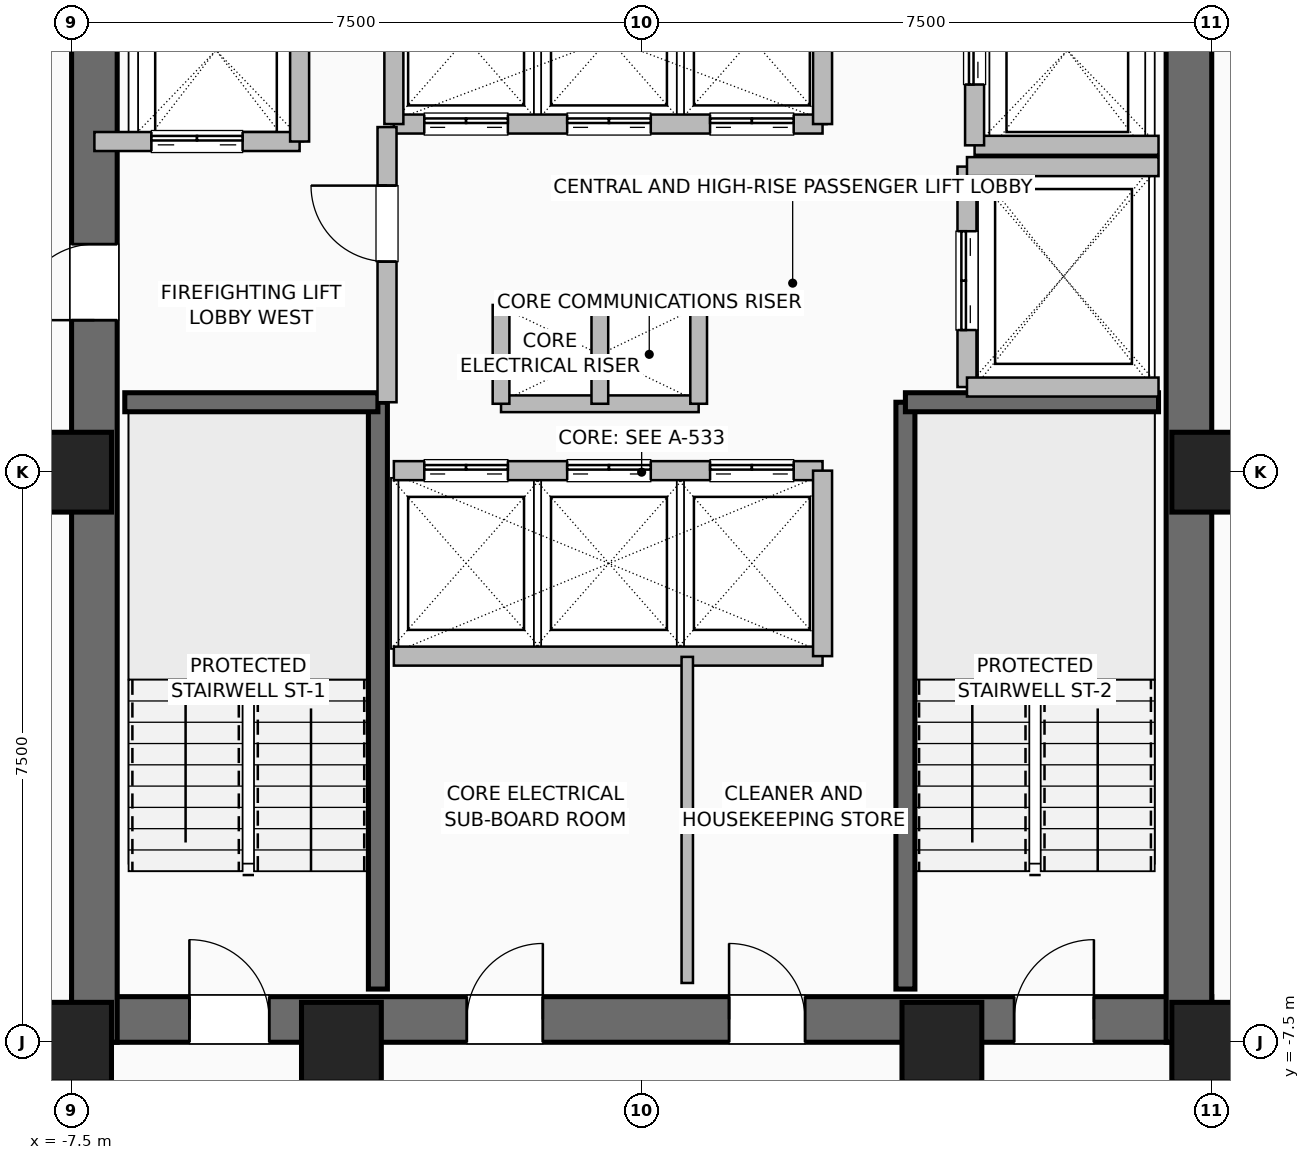
"""IFC4 building model, lengths in metres.
Left out: names, types, materials, properties, quantities, classifications, styles, units other than length and angle.
Written with IfcOpenShell. Run it as: python <this file> out.ifc"""

import sys

from ifc_helpers import new_model, si_unit, direction, frame, frame_2d, origin, origin_2d, place, context, subcontext, project, spatial, rectangle, hollow_rectangle, extrude, element, fill, save


model = new_model("IFC4")
c1 = context("Model", 3, precision=1e-05, world=origin(), true_north=direction((0.0, 1.0)))
c2 = subcontext(c1, "Body", "Model", "MODEL_VIEW")
j1 = project(units=[si_unit("LENGTHUNIT", "METRE"), si_unit("PLANEANGLEUNIT", "RADIAN")], contexts=[c1])
p1 = place(None, origin())
s1 = spatial("IfcSite", under=j1, at=p1, CompositionType="ELEMENT")
p2 = place(p1, origin())
s2 = spatial("IfcBuilding", under=s1, at=p2, CompositionType="ELEMENT")
p3 = place(p2, frame((0.0, 0.0, 126.4)))
s3 = spatial("IfcBuildingStorey", under=s2, at=p3, CompositionType="ELEMENT", Elevation=126.4)
for number, where, z_axis, x_axis in (
    (1, (-7.5, -7.5, 0.0), (0.0, 0.0, 1.0), (1.0, 0.0, 0.0)),
    (2, (-3.95, -7.5, 0.0), (0.0, 0.0, 1.0), (1.0, 0.0, 0.0)),
    (3, (3.95, -7.5, 0.0), (0.0, 0.0, 1.0), (1.0, 0.0, 0.0)),
    (4, (7.5, -7.5, 0.0), (0.0, 0.0, 1.0), (1.0, 0.0, 0.0)),
    (5, (7.5, 0.0, 0.0), (0.0, 0.0, 1.0), (1.0, 0.0, 0.0)),
    (6, (-7.5, 0.0, 0.0), (0.0, 0.0, 1.0), (1.0, 0.0, 0.0)),
):
    element("IfcColumn", number, at=place(p3, frame(where, z_axis=z_axis, x_axis=x_axis)), inside=s3, PredefinedType="COLUMN", context=c2, shape_type="SweptSolid", body=[
        extrude(hollow_rectangle(XDim=1.05, YDim=1.05, WallThickness=0.05, at=origin_2d()), origin(), (0.0, 0.0, 1.0), 3.6),
    ])
p4 = place(p3, frame((-7.5, -7.2, 0.0), z_axis=(0.0, 0.0, 1.0), x_axis=(1.0, 0.0, 0.0)))
e7 = element("IfcWall", 7, at=p4, inside=s3, PredefinedType="SHEAR", context=c2, shape_type="SweptSolid", body=[
    extrude(rectangle(XDim=15.0, YDim=0.6, at=frame_2d((7.5, 0.0))), origin(), (0.0, 0.0, 1.0), 3.36),
])
p5 = place(p4, frame((1.55, 0.0, 0.0)))
e8 = element("IfcOpeningElement", 8, at=p5, cuts=e7, PredefinedType="OPENING", context=c2, shape_type="SweptSolid", body=[
    extrude(rectangle(XDim=1.05, YDim=2.08, at=frame_2d((0.525, 1.04))), frame((0.0, 0.31, 0.0), z_axis=(0.0, -1.0, 0.0), x_axis=(1.0, 0.0, 0.0)), (0.0, 0.0, 1.0), 0.62),
])
p6 = place(p4, frame((12.4, 0.0, 0.0)))
e9 = element("IfcOpeningElement", 9, at=p6, cuts=e7, PredefinedType="OPENING", context=c2, shape_type="SweptSolid", body=[
    extrude(rectangle(XDim=1.05, YDim=2.08, at=frame_2d((0.525, 1.04))), frame((0.0, 0.31, 0.0), z_axis=(0.0, -1.0, 0.0), x_axis=(1.0, 0.0, 0.0)), (0.0, 0.0, 1.0), 0.62),
])
p7 = place(p4, frame((5.2, 0.0, 0.0)))
e10 = element("IfcOpeningElement", 10, at=p7, cuts=e7, PredefinedType="OPENING", context=c2, shape_type="SweptSolid", body=[
    extrude(rectangle(XDim=1.0, YDim=2.08, at=frame_2d((0.5, 1.04))), frame((0.0, 0.31, 0.0), z_axis=(0.0, -1.0, 0.0), x_axis=(1.0, 0.0, 0.0)), (0.0, 0.0, 1.0), 0.62),
])
p8 = place(p4, frame((8.65, 0.0, 0.0)))
e11 = element("IfcOpeningElement", 11, at=p8, cuts=e7, PredefinedType="OPENING", context=c2, shape_type="SweptSolid", body=[
    extrude(rectangle(XDim=1.0, YDim=2.08, at=frame_2d((0.5, 1.04))), frame((0.0, 0.31, 0.0), z_axis=(0.0, -1.0, 0.0), x_axis=(1.0, 0.0, 0.0)), (0.0, 0.0, 1.0), 0.62),
])
p9 = place(p3, frame((-7.2, -7.5, 0.0), z_axis=(0.0, 0.0, 1.0), x_axis=(0.0, 1.0, 0.0)))
e12 = element("IfcWall", 12, at=p9, inside=s3, PredefinedType="SHEAR", context=c2, shape_type="SweptSolid", body=[
    extrude(rectangle(XDim=15.0, YDim=0.6, at=frame_2d((7.5, 0.0))), origin(), (0.0, 0.0, 1.0), 3.36),
])
p10 = place(p9, frame((9.5, 0.0, 0.0)))
e13 = element("IfcOpeningElement", 13, at=p10, cuts=e12, PredefinedType="OPENING", context=c2, shape_type="SweptSolid", body=[
    extrude(rectangle(XDim=1.0, YDim=2.08, at=frame_2d((0.5, 1.04))), frame((0.0, 0.31, 0.0), z_axis=(0.0, -1.0, 0.0), x_axis=(1.0, 0.0, 0.0)), (0.0, 0.0, 1.0), 0.62),
])
p11 = place(p3, frame((7.2, -7.5, 0.0), z_axis=(0.0, 0.0, 1.0), x_axis=(0.0, 1.0, 0.0)))
e14 = element("IfcWall", 14, at=p11, inside=s3, PredefinedType="SHEAR", context=c2, shape_type="SweptSolid", body=[
    extrude(rectangle(XDim=15.0, YDim=0.6, at=frame_2d((7.5, 0.0))), origin(), (0.0, 0.0, 1.0), 3.36),
])
p12 = place(p3, frame((-3.47, -6.8, 0.0), z_axis=(0.0, 0.0, 1.0), x_axis=(0.0, 1.0, 0.0)))
e15 = element("IfcWall", 15, at=p12, inside=s3, PredefinedType="SHEAR", context=c2, shape_type="SweptSolid", body=[
    extrude(rectangle(XDim=7.72, YDim=0.25, at=frame_2d((3.86, 0.0))), origin(), (0.0, 0.0, 1.0), 3.36),
])
p13 = place(p3, frame((-6.8, 0.92, 0.0), z_axis=(0.0, 0.0, 1.0), x_axis=(1.0, 0.0, 0.0)))
e16 = element("IfcWall", 16, at=p13, inside=s3, PredefinedType="SHEAR", context=c2, shape_type="SweptSolid", body=[
    extrude(rectangle(XDim=3.33, YDim=0.25, at=frame_2d((1.665, 0.0))), origin(), (0.0, 0.0, 1.0), 3.36),
])
p14 = place(p3, frame((3.47, -6.8, 0.0), z_axis=(0.0, 0.0, 1.0), x_axis=(0.0, 1.0, 0.0)))
e17 = element("IfcWall", 17, at=p14, inside=s3, PredefinedType="SHEAR", context=c2, shape_type="SweptSolid", body=[
    extrude(rectangle(XDim=7.72, YDim=0.25, at=frame_2d((3.86, 0.0))), origin(), (0.0, 0.0, 1.0), 3.36),
])
p15 = place(p3, frame((3.47, 0.92, 0.0), z_axis=(0.0, 0.0, 1.0), x_axis=(1.0, 0.0, 0.0)))
e18 = element("IfcWall", 18, at=p15, inside=s3, PredefinedType="SHEAR", context=c2, shape_type="SweptSolid", body=[
    extrude(rectangle(XDim=3.33, YDim=0.25, at=frame_2d((1.665, 0.0))), origin(), (0.0, 0.0, 1.0), 3.36),
])
for number, where, z_axis, x_axis in (
    (19, (-1.85, 2.2, 0.0), (0.0, 0.0, 1.0), (1.0, 0.0, 0.0)),
    (20, (-1.85, 0.9, 0.0), (0.0, 0.0, 1.0), (1.0, 0.0, 0.0)),
):
    element("IfcWall", number, at=place(p3, frame(where, z_axis=z_axis, x_axis=x_axis)), inside=s3, PredefinedType="PARTITIONING", context=c2, shape_type="SweptSolid", body=[
        extrude(rectangle(XDim=2.6, YDim=0.22, at=frame_2d((1.3, 0.0))), origin(), (0.0, 0.0, 1.0), 3.36),
    ])
for number, where, z_axis, x_axis in (
    (21, (-0.55, 0.9, 0.0), (0.0, 0.0, 1.0), (0.0, 1.0, 0.0)),
    (22, (0.75, 0.9, 0.0), (0.0, 0.0, 1.0), (0.0, 1.0, 0.0)),
    (23, (-1.85, 0.9, 0.0), (0.0, 0.0, 1.0), (0.0, 1.0, 0.0)),
):
    element("IfcWall", number, at=place(p3, frame(where, z_axis=z_axis, x_axis=x_axis)), inside=s3, PredefinedType="PARTITIONING", context=c2, shape_type="SweptSolid", body=[
        extrude(rectangle(XDim=1.3, YDim=0.22, at=frame_2d((0.65, 0.0))), origin(), (0.0, 0.0, 1.0), 3.36),
    ])
p16 = place(p3, frame((-3.26, 0.02, 0.0), z_axis=(0.0, 0.0, 1.0), x_axis=(1.0, 0.0, 0.0)))
e24 = element("IfcWall", 24, at=p16, inside=s3, PredefinedType="SHEAR", context=c2, shape_type="SweptSolid", body=[
    extrude(rectangle(XDim=5.64, YDim=0.25, at=frame_2d((2.82, 0.0))), origin(), (0.0, 0.0, 1.0), 3.36),
])
p17 = place(p16, frame((0.4, 0.0, 0.0)))
e25 = element("IfcOpeningElement", 25, at=p17, cuts=e24, PredefinedType="OPENING", context=c2, shape_type="SweptSolid", body=[
    extrude(rectangle(XDim=1.1, YDim=2.2, at=frame_2d((0.55, 1.1))), frame((0.0, 0.135, 0.0), z_axis=(0.0, -1.0, 0.0), x_axis=(1.0, 0.0, 0.0)), (0.0, 0.0, 1.0), 0.27),
])
p18 = place(p16, frame((2.28, 0.0, 0.0)))
e26 = element("IfcOpeningElement", 26, at=p18, cuts=e24, PredefinedType="OPENING", context=c2, shape_type="SweptSolid", body=[
    extrude(rectangle(XDim=1.1, YDim=2.2, at=frame_2d((0.55, 1.1))), frame((0.0, 0.135, 0.0), z_axis=(0.0, -1.0, 0.0), x_axis=(1.0, 0.0, 0.0)), (0.0, 0.0, 1.0), 0.27),
])
p19 = place(p16, frame((4.16, 0.0, 0.0)))
e27 = element("IfcOpeningElement", 27, at=p19, cuts=e24, PredefinedType="OPENING", context=c2, shape_type="SweptSolid", body=[
    extrude(rectangle(XDim=1.1, YDim=2.2, at=frame_2d((0.55, 1.1))), frame((0.0, 0.135, 0.0), z_axis=(0.0, -1.0, 0.0), x_axis=(1.0, 0.0, 0.0)), (0.0, 0.0, 1.0), 0.27),
])
p20 = place(p3, frame((-3.26, -2.42, 0.0), z_axis=(0.0, 0.0, 1.0), x_axis=(1.0, 0.0, 0.0)))
e28 = element("IfcWall", 28, at=p20, inside=s3, PredefinedType="SHEAR", context=c2, shape_type="SweptSolid", body=[
    extrude(rectangle(XDim=5.64, YDim=0.25, at=frame_2d((2.82, 0.0))), origin(), (0.0, 0.0, 1.0), 3.36),
])
p21 = place(p3, frame((2.38, -2.42, 0.0), z_axis=(0.0, 0.0, 1.0), x_axis=(0.0, 1.0, 0.0)))
e29 = element("IfcWall", 29, at=p21, inside=s3, PredefinedType="SHEAR", context=c2, shape_type="SweptSolid", body=[
    extrude(rectangle(XDim=2.44, YDim=0.25, at=frame_2d((1.22, 0.0))), origin(), (0.0, 0.0, 1.0), 3.36),
])
p22 = place(p3, frame((-3.26, 4.58, 0.0), z_axis=(0.0, 0.0, 1.0), x_axis=(1.0, 0.0, 0.0)))
e30 = element("IfcWall", 30, at=p22, inside=s3, PredefinedType="SHEAR", context=c2, shape_type="SweptSolid", body=[
    extrude(rectangle(XDim=5.64, YDim=0.25, at=frame_2d((2.82, 0.0))), origin(), (0.0, 0.0, 1.0), 3.36),
])
p23 = place(p22, frame((0.4, 0.0, 0.0)))
e31 = element("IfcOpeningElement", 31, at=p23, cuts=e30, PredefinedType="OPENING", context=c2, shape_type="SweptSolid", body=[
    extrude(rectangle(XDim=1.1, YDim=2.2, at=frame_2d((0.55, 1.1))), frame((0.0, 0.135, 0.0), z_axis=(0.0, -1.0, 0.0), x_axis=(1.0, 0.0, 0.0)), (0.0, 0.0, 1.0), 0.27),
])
p24 = place(p22, frame((2.28, 0.0, 0.0)))
e32 = element("IfcOpeningElement", 32, at=p24, cuts=e30, PredefinedType="OPENING", context=c2, shape_type="SweptSolid", body=[
    extrude(rectangle(XDim=1.1, YDim=2.2, at=frame_2d((0.55, 1.1))), frame((0.0, 0.135, 0.0), z_axis=(0.0, -1.0, 0.0), x_axis=(1.0, 0.0, 0.0)), (0.0, 0.0, 1.0), 0.27),
])
p25 = place(p22, frame((4.16, 0.0, 0.0)))
e33 = element("IfcOpeningElement", 33, at=p25, cuts=e30, PredefinedType="OPENING", context=c2, shape_type="SweptSolid", body=[
    extrude(rectangle(XDim=1.1, YDim=2.2, at=frame_2d((0.55, 1.1))), frame((0.0, 0.135, 0.0), z_axis=(0.0, -1.0, 0.0), x_axis=(1.0, 0.0, 0.0)), (0.0, 0.0, 1.0), 0.27),
])
for number, where, z_axis, x_axis in (
    (34, (-3.26, 4.58, 0.0), (0.0, 0.0, 1.0), (0.0, 1.0, 0.0)),
    (35, (2.38, 4.58, 0.0), (0.0, 0.0, 1.0), (0.0, 1.0, 0.0)),
):
    element("IfcWall", number, at=place(p3, frame(where, z_axis=z_axis, x_axis=x_axis)), inside=s3, PredefinedType="SHEAR", context=c2, shape_type="SweptSolid", body=[
        extrude(rectangle(XDim=2.22, YDim=0.25, at=frame_2d((1.11, 0.0))), origin(), (0.0, 0.0, 1.0), 3.36),
    ])
p26 = place(p3, frame((-7.2, 4.35, 0.0), z_axis=(0.0, 0.0, 1.0), x_axis=(1.0, 0.0, 0.0)))
e36 = element("IfcWall", 36, at=p26, inside=s3, PredefinedType="SHEAR", context=c2, shape_type="SweptSolid", body=[
    extrude(rectangle(XDim=2.7, YDim=0.25, at=frame_2d((1.35, 0.0))), origin(), (0.0, 0.0, 1.0), 3.36),
])
p27 = place(p26, frame((0.75, 0.0, 0.0)))
e37 = element("IfcOpeningElement", 37, at=p27, cuts=e36, PredefinedType="OPENING", context=c2, shape_type="SweptSolid", body=[
    extrude(rectangle(XDim=1.2, YDim=2.2, at=frame_2d((0.6, 1.1))), frame((0.0, 0.135, 0.0), z_axis=(0.0, -1.0, 0.0), x_axis=(1.0, 0.0, 0.0)), (0.0, 0.0, 1.0), 0.27),
])
p28 = place(p3, frame((-4.5, 4.35, 0.0), z_axis=(0.0, 0.0, 1.0), x_axis=(0.0, 1.0, 0.0)))
e38 = element("IfcWall", 38, at=p28, inside=s3, PredefinedType="SHEAR", context=c2, shape_type="SweptSolid", body=[
    extrude(rectangle(XDim=2.85, YDim=0.25, at=frame_2d((1.425, 0.0))), origin(), (0.0, 0.0, 1.0), 3.36),
])
p29 = place(p3, frame((4.38, 4.3, 0.0), z_axis=(0.0, 0.0, 1.0), x_axis=(1.0, 0.0, 0.0)))
e39 = element("IfcWall", 39, at=p29, inside=s3, PredefinedType="SHEAR", context=c2, shape_type="SweptSolid", body=[
    extrude(rectangle(XDim=2.42, YDim=0.25, at=frame_2d((1.21, 0.0))), origin(), (0.0, 0.0, 1.0), 3.36),
])
p30 = place(p3, frame((4.38, 4.3, 0.0), z_axis=(0.0, 0.0, 1.0), x_axis=(0.0, 1.0, 0.0)))
e40 = element("IfcWall", 40, at=p30, inside=s3, PredefinedType="SHEAR", context=c2, shape_type="SweptSolid", body=[
    extrude(rectangle(XDim=2.5, YDim=0.25, at=frame_2d((1.25, 0.0))), origin(), (0.0, 0.0, 1.0), 3.36),
])
p31 = place(p30, frame((0.8, 0.0, 0.0)))
e41 = element("IfcOpeningElement", 41, at=p31, cuts=e40, PredefinedType="OPENING", context=c2, shape_type="SweptSolid", body=[
    extrude(rectangle(XDim=1.2, YDim=2.2, at=frame_2d((0.6, 1.1))), frame((0.0, 0.135, 0.0), z_axis=(0.0, -1.0, 0.0), x_axis=(1.0, 0.0, 0.0)), (0.0, 0.0, 1.0), 0.27),
])
p32 = place(p3, frame((4.28, 1.12, 0.0), z_axis=(0.0, 0.0, 1.0), x_axis=(0.0, 1.0, 0.0)))
e42 = element("IfcWall", 42, at=p32, inside=s3, PredefinedType="SHEAR", context=c2, shape_type="SweptSolid", body=[
    extrude(rectangle(XDim=2.9, YDim=0.25, at=frame_2d((1.45, 0.0))), origin(), (0.0, 0.0, 1.0), 3.36),
])
p33 = place(p32, frame((0.75, 0.0, 0.0)))
e43 = element("IfcOpeningElement", 43, at=p33, cuts=e42, PredefinedType="OPENING", context=c2, shape_type="SweptSolid", body=[
    extrude(rectangle(XDim=1.3, YDim=2.3, at=frame_2d((0.65, 1.15))), frame((0.0, 0.135, 0.0), z_axis=(0.0, -1.0, 0.0), x_axis=(1.0, 0.0, 0.0)), (0.0, 0.0, 1.0), 0.27),
])
for number, where, z_axis, x_axis in (
    (44, (4.28, 1.12, 0.0), (0.0, 0.0, 1.0), (1.0, 0.0, 0.0)),
    (45, (4.28, 4.02, 0.0), (0.0, 0.0, 1.0), (1.0, 0.0, 0.0)),
):
    element("IfcWall", number, at=place(p3, frame(where, z_axis=z_axis, x_axis=x_axis)), inside=s3, PredefinedType="SHEAR", context=c2, shape_type="SweptSolid", body=[
        extrude(rectangle(XDim=2.52, YDim=0.25, at=frame_2d((1.26, 0.0))), origin(), (0.0, 0.0, 1.0), 3.36),
    ])
p34 = place(p3, frame((-3.35, 0.92, 0.0), z_axis=(0.0, 0.0, 1.0), x_axis=(0.0, 1.0, 0.0)))
e46 = element("IfcWall", 46, at=p34, inside=s3, PredefinedType="SHEAR", context=c2, shape_type="SweptSolid", body=[
    extrude(rectangle(XDim=3.62, YDim=0.25, at=frame_2d((1.81, 0.0))), origin(), (0.0, 0.0, 1.0), 3.36),
])
p35 = place(p34, frame((1.85, 0.0, 0.0)))
e47 = element("IfcOpeningElement", 47, at=p35, cuts=e46, PredefinedType="OPENING", context=c2, shape_type="SweptSolid", body=[
    extrude(rectangle(XDim=1.0, YDim=2.08, at=frame_2d((0.5, 1.04))), frame((0.0, 0.135, 0.0), z_axis=(0.0, -1.0, 0.0), x_axis=(1.0, 0.0, 0.0)), (0.0, 0.0, 1.0), 0.27),
])
p36 = place(p3, frame((0.6, -6.72, 0.0), z_axis=(0.0, 0.0, 1.0), x_axis=(0.0, 1.0, 0.0)))
e48 = element("IfcWall", 48, at=p36, inside=s3, PredefinedType="PARTITIONING", context=c2, shape_type="SweptSolid", body=[
    extrude(rectangle(XDim=4.29, YDim=0.15, at=frame_2d((2.145, 0.0))), origin(), (0.0, 0.0, 1.0), 3.36),
])
p37 = place(p3, frame((7.45, -7.48, 0.0), z_axis=(0.0, 0.0, 1.0), x_axis=(1.0, 0.0, 0.0)))
e49 = element("IfcWall", 49, at=p37, inside=s3, PredefinedType="PARTITIONING", context=c2, shape_type="SweptSolid", body=[
    extrude(rectangle(XDim=0.95, YDim=0.15, at=frame_2d((0.475, 0.0))), origin(), (0.0, 0.0, 1.0), 3.36),
])
p38 = place(p5, origin())
e50 = element("IfcDoor", 50, at=p38, inside=s3, OperationType="SINGLE_SWING_LEFT", PredefinedType="DOOR", context=c2, shape_type="SweptSolid", body=[
    extrude(rectangle(XDim=1.05, YDim=2.08, at=frame_2d((0.525, 1.04))), frame((0.0, 0.025, 0.0), z_axis=(0.0, -1.0, 0.0), x_axis=(1.0, 0.0, 0.0)), (0.0, 0.0, 1.0), 0.05),
])
fill(e8, e50)
p39 = place(p6, origin())
e51 = element("IfcDoor", 51, at=p39, inside=s3, OperationType="SINGLE_SWING_RIGHT", PredefinedType="DOOR", context=c2, shape_type="SweptSolid", body=[
    extrude(rectangle(XDim=1.05, YDim=2.08, at=frame_2d((0.525, 1.04))), frame((0.0, 0.025, 0.0), z_axis=(0.0, -1.0, 0.0), x_axis=(1.0, 0.0, 0.0)), (0.0, 0.0, 1.0), 0.05),
])
fill(e9, e51)
p40 = place(p10, origin())
e52 = element("IfcDoor", 52, at=p40, inside=s3, OperationType="SINGLE_SWING_LEFT", PredefinedType="DOOR", context=c2, shape_type="SweptSolid", body=[
    extrude(rectangle(XDim=1.0, YDim=2.08, at=frame_2d((0.5, 1.04))), frame((0.0, 0.025, 0.0), z_axis=(0.0, -1.0, 0.0), x_axis=(1.0, 0.0, 0.0)), (0.0, 0.0, 1.0), 0.05),
])
fill(e13, e52)
p41 = place(p7, origin())
e53 = element("IfcDoor", 53, at=p41, inside=s3, OperationType="SINGLE_SWING_RIGHT", PredefinedType="DOOR", context=c2, shape_type="SweptSolid", body=[
    extrude(rectangle(XDim=1.0, YDim=2.08, at=frame_2d((0.5, 1.04))), frame((0.0, 0.025, 0.0), z_axis=(0.0, -1.0, 0.0), x_axis=(1.0, 0.0, 0.0)), (0.0, 0.0, 1.0), 0.05),
])
fill(e10, e53)
p42 = place(p8, origin())
e54 = element("IfcDoor", 54, at=p42, inside=s3, OperationType="SINGLE_SWING_LEFT", PredefinedType="DOOR", context=c2, shape_type="SweptSolid", body=[
    extrude(rectangle(XDim=1.0, YDim=2.08, at=frame_2d((0.5, 1.04))), frame((0.0, 0.025, 0.0), z_axis=(0.0, -1.0, 0.0), x_axis=(1.0, 0.0, 0.0)), (0.0, 0.0, 1.0), 0.05),
])
fill(e11, e54)
p43 = place(p17, origin())
e55 = element("IfcDoor", 55, at=p43, inside=s3, OperationType="DOUBLE_DOOR_SLIDING", PredefinedType="DOOR", context=c2, shape_type="SweptSolid", body=[
    extrude(rectangle(XDim=1.1, YDim=2.2, at=frame_2d((0.55, 1.1))), frame((0.0, 0.025, 0.0), z_axis=(0.0, -1.0, 0.0), x_axis=(1.0, 0.0, 0.0)), (0.0, 0.0, 1.0), 0.05),
])
fill(e25, e55)
p44 = place(p18, origin())
e56 = element("IfcDoor", 56, at=p44, inside=s3, OperationType="DOUBLE_DOOR_SLIDING", PredefinedType="DOOR", context=c2, shape_type="SweptSolid", body=[
    extrude(rectangle(XDim=1.1, YDim=2.2, at=frame_2d((0.55, 1.1))), frame((0.0, 0.025, 0.0), z_axis=(0.0, -1.0, 0.0), x_axis=(1.0, 0.0, 0.0)), (0.0, 0.0, 1.0), 0.05),
])
fill(e26, e56)
p45 = place(p19, origin())
e57 = element("IfcDoor", 57, at=p45, inside=s3, OperationType="DOUBLE_DOOR_SLIDING", PredefinedType="DOOR", context=c2, shape_type="SweptSolid", body=[
    extrude(rectangle(XDim=1.1, YDim=2.2, at=frame_2d((0.55, 1.1))), frame((0.0, 0.025, 0.0), z_axis=(0.0, -1.0, 0.0), x_axis=(1.0, 0.0, 0.0)), (0.0, 0.0, 1.0), 0.05),
])
fill(e27, e57)
p46 = place(p23, origin())
e58 = element("IfcDoor", 58, at=p46, inside=s3, OperationType="DOUBLE_DOOR_SLIDING", PredefinedType="DOOR", context=c2, shape_type="SweptSolid", body=[
    extrude(rectangle(XDim=1.1, YDim=2.2, at=frame_2d((0.55, 1.1))), frame((0.0, 0.025, 0.0), z_axis=(0.0, -1.0, 0.0), x_axis=(1.0, 0.0, 0.0)), (0.0, 0.0, 1.0), 0.05),
])
fill(e31, e58)
p47 = place(p24, origin())
e59 = element("IfcDoor", 59, at=p47, inside=s3, OperationType="DOUBLE_DOOR_SLIDING", PredefinedType="DOOR", context=c2, shape_type="SweptSolid", body=[
    extrude(rectangle(XDim=1.1, YDim=2.2, at=frame_2d((0.55, 1.1))), frame((0.0, 0.025, 0.0), z_axis=(0.0, -1.0, 0.0), x_axis=(1.0, 0.0, 0.0)), (0.0, 0.0, 1.0), 0.05),
])
fill(e32, e59)
p48 = place(p25, origin())
e60 = element("IfcDoor", 60, at=p48, inside=s3, OperationType="DOUBLE_DOOR_SLIDING", PredefinedType="DOOR", context=c2, shape_type="SweptSolid", body=[
    extrude(rectangle(XDim=1.1, YDim=2.2, at=frame_2d((0.55, 1.1))), frame((0.0, 0.025, 0.0), z_axis=(0.0, -1.0, 0.0), x_axis=(1.0, 0.0, 0.0)), (0.0, 0.0, 1.0), 0.05),
])
fill(e33, e60)
p49 = place(p27, origin())
e61 = element("IfcDoor", 61, at=p49, inside=s3, OperationType="DOUBLE_DOOR_SLIDING", PredefinedType="DOOR", context=c2, shape_type="SweptSolid", body=[
    extrude(rectangle(XDim=1.2, YDim=2.2, at=frame_2d((0.6, 1.1))), frame((0.0, 0.025, 0.0), z_axis=(0.0, -1.0, 0.0), x_axis=(1.0, 0.0, 0.0)), (0.0, 0.0, 1.0), 0.05),
])
fill(e37, e61)
p50 = place(p31, origin())
e62 = element("IfcDoor", 62, at=p50, inside=s3, OperationType="DOUBLE_DOOR_SLIDING", PredefinedType="DOOR", context=c2, shape_type="SweptSolid", body=[
    extrude(rectangle(XDim=1.2, YDim=2.2, at=frame_2d((0.6, 1.1))), frame((0.0, 0.025, 0.0), z_axis=(0.0, -1.0, 0.0), x_axis=(1.0, 0.0, 0.0)), (0.0, 0.0, 1.0), 0.05),
])
fill(e41, e62)
p51 = place(p33, origin())
e63 = element("IfcDoor", 63, at=p51, inside=s3, OperationType="DOUBLE_DOOR_SLIDING", PredefinedType="DOOR", context=c2, shape_type="SweptSolid", body=[
    extrude(rectangle(XDim=1.3, YDim=2.3, at=frame_2d((0.65, 1.15))), frame((0.0, 0.025, 0.0), z_axis=(0.0, -1.0, 0.0), x_axis=(1.0, 0.0, 0.0)), (0.0, 0.0, 1.0), 0.05),
])
fill(e43, e63)
p52 = place(p35, origin())
e64 = element("IfcDoor", 64, at=p52, inside=s3, OperationType="SINGLE_SWING_RIGHT", PredefinedType="DOOR", context=c2, shape_type="SweptSolid", body=[
    extrude(rectangle(XDim=1.0, YDim=2.08, at=frame_2d((0.5, 1.04))), frame((0.0, 0.025, 0.0), z_axis=(0.0, -1.0, 0.0), x_axis=(1.0, 0.0, 0.0)), (0.0, 0.0, 1.0), 0.05),
])
fill(e47, e64)
save(model, sys.argv[1])
